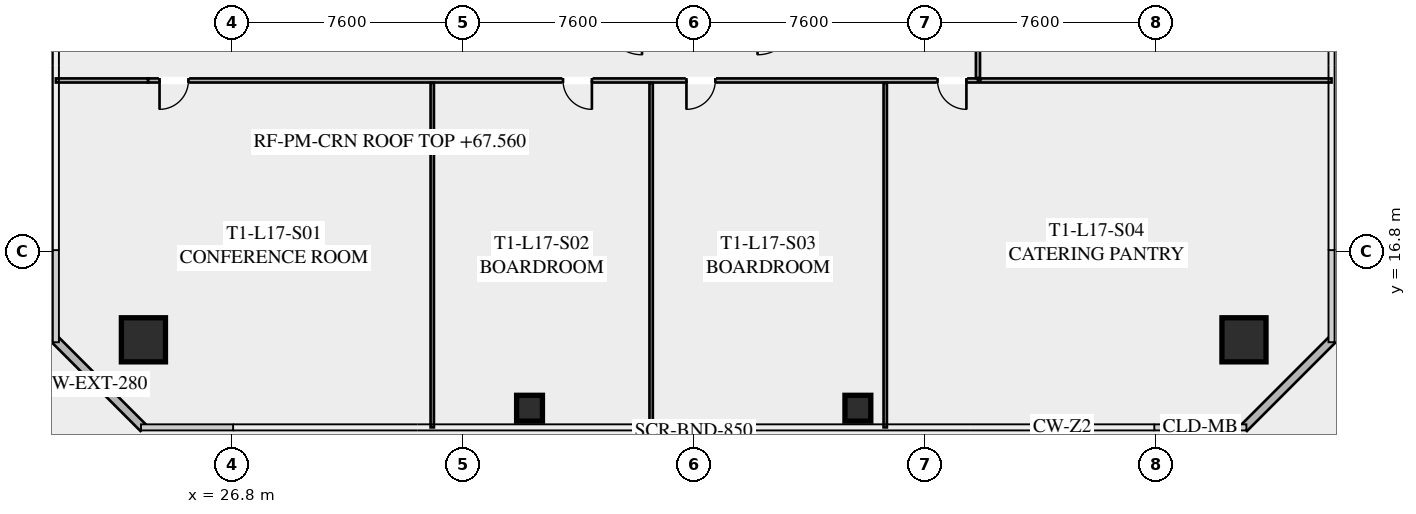
"""IFC4 building model, lengths in metres.
Left out: names, types, materials, properties, quantities, classifications, styles, units other than length and angle.
Written with IfcOpenShell. Run it as: python <this file> out.ifc"""

import sys

from ifc_helpers import new_model, si_unit, direction, frame, frame_2d, origin, origin_2d, place, context, subcontext, project, spatial, rectangle, hollow_rectangle, extrude, element, fill, save


model = new_model("IFC4")
c1 = context("Model", 3, precision=1e-05, world=origin(), true_north=direction((0.0, 1.0)))
c2 = subcontext(c1, "Body", "Model", "MODEL_VIEW")
j1 = project(units=[si_unit("LENGTHUNIT", "METRE"), si_unit("PLANEANGLEUNIT", "RADIAN")], contexts=[c1])
p1 = place(None, origin())
s1 = spatial("IfcSite", under=j1, at=p1, CompositionType="ELEMENT")
p2 = place(p1, origin())
s2 = spatial("IfcBuilding", under=s1, at=p2, CompositionType="ELEMENT")
p3 = place(p2, frame((0.0, 0.0, 67.2)))
s3 = spatial("IfcBuildingStorey", under=s2, at=p3, CompositionType="ELEMENT", Elevation=67.2)
for number, where, z_axis, x_axis in (
    (1, (23.9, 13.9, -0.195), (0.0, 0.0, 1.0), (1.0, 0.0, 0.0)),
    (2, (60.1, 13.9, -0.195), (0.0, 0.0, 1.0), (1.0, 0.0, 0.0)),
):
    element("IfcColumn", number, at=place(p3, frame(where, z_axis=z_axis, x_axis=x_axis)), inside=s3, PredefinedType="COLUMN", context=c2, shape_type="SweptSolid", body=[
        extrude(hollow_rectangle(XDim=1.45, YDim=1.45, WallThickness=0.055, at=origin_2d()), origin(), (0.0, 0.0, 1.0), 3.545),
    ])
for number, where, z_axis, x_axis in (
    (3, (36.6, 11.65, -0.195), (0.0, 0.0, 1.0), (1.0, 0.0, 0.0)),
    (4, (47.4, 11.65, -0.195), (0.0, 0.0, 1.0), (1.0, 0.0, 0.0)),
):
    element("IfcColumn", number, at=place(p3, frame(where, z_axis=z_axis, x_axis=x_axis)), inside=s3, PredefinedType="COLUMN", context=c2, shape_type="SweptSolid", body=[
        extrude(hollow_rectangle(XDim=0.85, YDim=0.85, WallThickness=0.035, at=origin_2d()), origin(), (0.0, 0.0, 1.0), 3.545),
    ])
for number, where, z_axis, x_axis in (
    (5, (23.9, 11.0, 0.0), (0.0, 0.0, 1.0), (-0.707, 0.707, 0.0)),
    (6, (63.0, 13.9, 0.0), (0.0, 0.0, 1.0), (-0.707, -0.707, 0.0)),
):
    element("IfcWall", number, at=place(p3, frame(where, z_axis=z_axis, x_axis=x_axis)), inside=s3, PredefinedType="SOLIDWALL", context=c2, shape_type="SweptSolid", body=[
        extrude(rectangle(XDim=4.101, YDim=0.28, at=frame_2d((2.051, 0.0))), origin(), (0.0, 0.0, 1.0), 3.35),
    ])
p4 = place(p3, frame((51.35, 22.43, 0.0), z_axis=(0.0, 0.0, 1.0), x_axis=(-1.0, 0.0, 0.0)))
e7 = element("IfcWall", 7, at=p4, inside=s3, PredefinedType="PARTITIONING", context=c2, shape_type="SweptSolid", body=[
    extrude(rectangle(XDim=27.3, YDim=0.135, at=frame_2d((13.65, 0.0))), origin(), (0.0, 0.0, 1.0), 2.703),
])
p5 = place(p4, frame((25.97, 0.0, 0.0)))
e8 = element("IfcOpeningElement", 8, at=p5, cuts=e7, PredefinedType="OPENING", context=c2, shape_type="SweptSolid", body=[
    extrude(rectangle(XDim=0.95, YDim=2.05, at=frame_2d((0.475, 1.025))), frame((0.0, 0.077, 0.0), z_axis=(0.0, -1.0, 0.0), x_axis=(1.0, 0.0, 0.0)), (0.0, 0.0, 1.0), 0.155),
])
p6 = place(p4, frame((12.698, 0.0, 0.0)))
e9 = element("IfcOpeningElement", 9, at=p6, cuts=e7, PredefinedType="OPENING", context=c2, shape_type="SweptSolid", body=[
    extrude(rectangle(XDim=0.95, YDim=2.05, at=frame_2d((0.475, 1.025))), frame((0.0, 0.077, 0.0), z_axis=(0.0, -1.0, 0.0), x_axis=(1.0, 0.0, 0.0)), (0.0, 0.0, 1.0), 0.155),
])
p7 = place(p4, frame((8.639, 0.0, 0.0)))
e10 = element("IfcOpeningElement", 10, at=p7, cuts=e7, PredefinedType="OPENING", context=c2, shape_type="SweptSolid", body=[
    extrude(rectangle(XDim=0.95, YDim=2.05, at=frame_2d((0.475, 1.025))), frame((0.0, 0.077, 0.0), z_axis=(0.0, -1.0, 0.0), x_axis=(1.0, 0.0, 0.0)), (0.0, 0.0, 1.0), 0.155),
])
p8 = place(p4, frame((0.38, 0.0, 0.0)))
e11 = element("IfcOpeningElement", 11, at=p8, cuts=e7, PredefinedType="OPENING", context=c2, shape_type="SweptSolid", body=[
    extrude(rectangle(XDim=0.95, YDim=2.05, at=frame_2d((0.475, 1.025))), frame((0.0, 0.077, 0.0), z_axis=(0.0, -1.0, 0.0), x_axis=(1.0, 0.0, 0.0)), (0.0, 0.0, 1.0), 0.155),
])
p9 = place(p3, frame((21.02, 22.43, 0.0), z_axis=(0.0, 0.0, 1.0), x_axis=(1.0, 0.0, 0.0)))
e12 = element("IfcWall", 12, at=p9, inside=s3, PredefinedType="PARTITIONING", context=c2, shape_type="SweptSolid", body=[
    extrude(rectangle(XDim=3.03, YDim=0.135, at=frame_2d((1.515, 0.0))), origin(), (0.0, 0.0, 1.0), 2.703),
])
for number, where, z_axis, x_axis in (
    (13, (33.4, 11.02, 0.0), (0.0, 0.0, 1.0), (0.0, 1.0, 0.0)),
    (14, (40.6, 11.02, 0.0), (0.0, 0.0, 1.0), (0.0, 1.0, 0.0)),
    (15, (48.3, 11.02, 0.0), (0.0, 0.0, 1.0), (0.0, 1.0, 0.0)),
):
    element("IfcWall", number, at=place(p3, frame(where, z_axis=z_axis, x_axis=x_axis)), inside=s3, PredefinedType="PARTITIONING", context=c2, shape_type="SweptSolid", body=[
        extrude(rectangle(XDim=11.33, YDim=0.11, at=frame_2d((5.665, 0.0))), origin(), (0.0, 0.0, 1.0), 2.703),
    ])
p10 = place(p3, frame((51.35, 42.77, 0.0), z_axis=(0.0, 0.0, 1.0), x_axis=(0.0, -1.0, 0.0)))
e16 = element("IfcWall", 16, at=p10, inside=s3, PredefinedType="PARTITIONING", context=c2, shape_type="SweptSolid", body=[
    extrude(rectangle(XDim=20.26, YDim=0.135, at=frame_2d((10.13, 0.0))), origin(), (0.0, 0.0, 1.0), 2.703),
])
p11 = place(p10, frame((10.181, 0.0, 0.0)))
e17 = element("IfcOpeningElement", 17, at=p11, cuts=e16, PredefinedType="OPENING", context=c2, shape_type="SweptSolid", body=[
    extrude(rectangle(XDim=0.95, YDim=2.05, at=frame_2d((0.475, 1.025))), frame((0.0, 0.077, 0.0), z_axis=(0.0, -1.0, 0.0), x_axis=(1.0, 0.0, 0.0)), (0.0, 0.0, 1.0), 0.155),
])
p12 = place(p10, frame((0.3, 0.0, 0.0)))
e18 = element("IfcOpeningElement", 18, at=p12, cuts=e16, PredefinedType="OPENING", context=c2, shape_type="SweptSolid", body=[
    extrude(rectangle(XDim=0.95, YDim=2.05, at=frame_2d((0.475, 1.025))), frame((0.0, 0.077, 0.0), z_axis=(0.0, -1.0, 0.0), x_axis=(1.0, 0.0, 0.0)), (0.0, 0.0, 1.0), 0.155),
])
p13 = place(p3, frame((51.43, 22.43, 0.0), z_axis=(0.0, 0.0, 1.0), x_axis=(1.0, 0.0, 0.0)))
e19 = element("IfcWall", 19, at=p13, inside=s3, PredefinedType="PARTITIONING", context=c2, shape_type="SweptSolid", body=[
    extrude(rectangle(XDim=11.55, YDim=0.135, at=frame_2d((5.775, 0.0))), origin(), (0.0, 0.0, 1.0), 2.703),
])
p14 = place(p5, origin())
e20 = element("IfcDoor", 20, at=p14, inside=s3, OperationType="SINGLE_SWING_RIGHT", PredefinedType="DOOR", context=c2, shape_type="SweptSolid", body=[
    extrude(rectangle(XDim=0.95, YDim=2.05, at=frame_2d((0.475, 1.025))), frame((0.0, 0.025, 0.0), z_axis=(0.0, -1.0, 0.0), x_axis=(1.0, 0.0, 0.0)), (0.0, 0.0, 1.0), 0.05),
])
fill(e8, e20)
p15 = place(p6, origin())
e21 = element("IfcDoor", 21, at=p15, inside=s3, OperationType="SINGLE_SWING_LEFT", PredefinedType="DOOR", context=c2, shape_type="SweptSolid", body=[
    extrude(rectangle(XDim=0.95, YDim=2.05, at=frame_2d((0.475, 1.025))), frame((0.0, 0.025, 0.0), z_axis=(0.0, -1.0, 0.0), x_axis=(1.0, 0.0, 0.0)), (0.0, 0.0, 1.0), 0.05),
])
fill(e9, e21)
p16 = place(p7, origin())
e22 = element("IfcDoor", 22, at=p16, inside=s3, OperationType="SINGLE_SWING_RIGHT", PredefinedType="DOOR", context=c2, shape_type="SweptSolid", body=[
    extrude(rectangle(XDim=0.95, YDim=2.05, at=frame_2d((0.475, 1.025))), frame((0.0, 0.025, 0.0), z_axis=(0.0, -1.0, 0.0), x_axis=(1.0, 0.0, 0.0)), (0.0, 0.0, 1.0), 0.05),
])
fill(e10, e22)
p17 = place(p8, origin())
e23 = element("IfcDoor", 23, at=p17, inside=s3, OperationType="SINGLE_SWING_LEFT", PredefinedType="DOOR", context=c2, shape_type="SweptSolid", body=[
    extrude(rectangle(XDim=0.95, YDim=2.05, at=frame_2d((0.475, 1.025))), frame((0.0, 0.025, 0.0), z_axis=(0.0, -1.0, 0.0), x_axis=(1.0, 0.0, 0.0)), (0.0, 0.0, 1.0), 0.05),
])
fill(e11, e23)
save(model, sys.argv[1])
